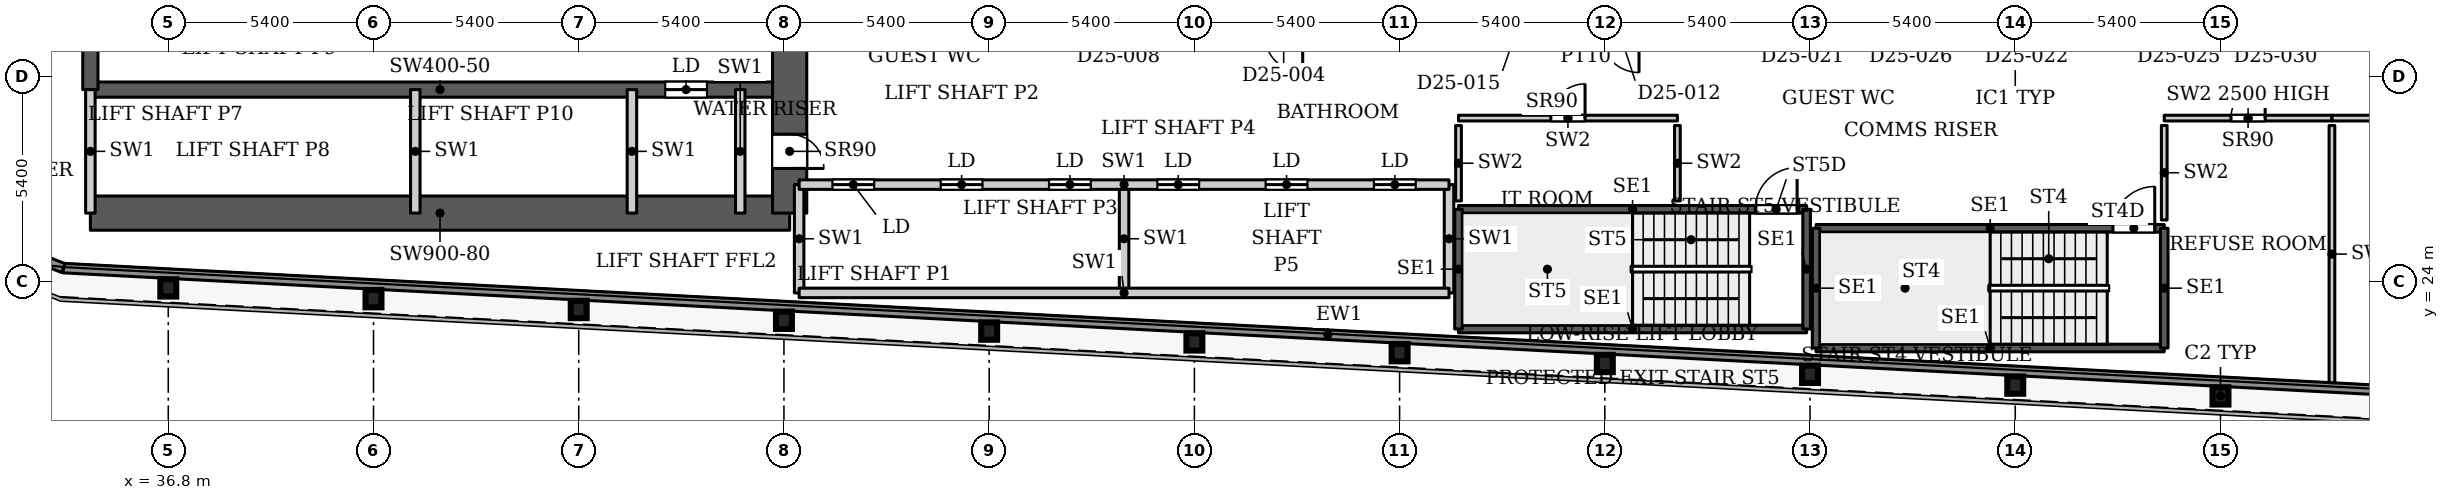
"""IFC4 building model, lengths in metres.
Left out: names, types, materials, properties, quantities, classifications, styles, units other than length and angle.
Written with IfcOpenShell. Run it as: python <this file> out.ifc"""

import sys

from ifc_helpers import new_model, si_unit, direction, frame, frame_2d, origin, origin_2d, place, context, subcontext, project, spatial, rectangle, i_section, extrude, source, transform, mapped, element, fill, save


model = new_model("IFC4")
c1 = context("Model", 3, precision=1e-05, world=origin(), true_north=direction((0.0, 1.0)))
c2 = subcontext(c1, "Body", "Model", "MODEL_VIEW")
j1 = project(units=[si_unit("LENGTHUNIT", "METRE"), si_unit("PLANEANGLEUNIT", "RADIAN")], contexts=[c1])
p1 = place(None, origin())
s1 = spatial("IfcSite", under=j1, at=p1, CompositionType="ELEMENT")
p2 = place(p1, origin())
s2 = spatial("IfcBuilding", under=s1, at=p2, CompositionType="ELEMENT")
p3 = place(p2, frame((0.0, 0.0, 113.6)))
s3 = spatial("IfcBuildingStorey", under=s2, at=p3, CompositionType="ELEMENT", Elevation=113.6)
for number, where, z_axis, x_axis in (
    (1, (90.8, 20.99, 0.0), (0.0, 0.0, 1.0), (1.0, 0.0, 0.0)),
    (2, (85.4, 21.274, 0.0), (0.0, 0.0, 1.0), (1.0, 0.0, 0.0)),
    (3, (80.0, 21.558, 0.0), (0.0, 0.0, 1.0), (1.0, 0.0, 0.0)),
    (4, (74.6, 21.843, 0.0), (0.0, 0.0, 1.0), (1.0, 0.0, 0.0)),
    (5, (69.2, 22.127, 0.0), (0.0, 0.0, 1.0), (1.0, 0.0, 0.0)),
    (6, (63.8, 22.411, 0.0), (0.0, 0.0, 1.0), (1.0, 0.0, 0.0)),
    (7, (58.4, 22.695, 0.0), (0.0, 0.0, 1.0), (1.0, 0.0, 0.0)),
    (8, (53.0, 22.98, 0.0), (0.0, 0.0, 1.0), (1.0, 0.0, 0.0)),
    (9, (47.6, 23.264, 0.0), (0.0, 0.0, 1.0), (1.0, 0.0, 0.0)),
    (10, (42.2, 23.548, 0.0), (0.0, 0.0, 1.0), (1.0, 0.0, 0.0)),
    (11, (36.8, 23.832, 0.0), (0.0, 0.0, 1.0), (1.0, 0.0, 0.0)),
):
    element("IfcColumn", number, at=place(p3, frame(where, z_axis=z_axis, x_axis=x_axis)), inside=s3, PredefinedType="COLUMN", context=c2, shape_type="SweptSolid", body=[
        extrude(i_section(OverallWidth=0.418, OverallDepth=0.455, WebThickness=0.042, FlangeThickness=0.068, FilletRadius=0.014, at=origin_2d()), origin(), (0.0, 0.0, 1.0), 3.9),
    ])
p4 = place(p3, frame((34.75, 25.8, 0.0), z_axis=(0.0, 0.0, 1.0), x_axis=(1.0, 0.0, 0.0)))
e12 = element("IfcWall", 12, at=p4, inside=s3, PredefinedType="SHEAR", context=c2, shape_type="SweptSolid", body=[
    extrude(rectangle(XDim=18.4, YDim=0.9, at=frame_2d((9.2, 0.0))), origin(), (0.0, 0.0, 1.0), 3.9),
])
p5 = place(p3, frame((34.75, 29.05, 0.0), z_axis=(0.0, 0.0, 1.0), x_axis=(1.0, 0.0, 0.0)))
e13 = element("IfcWall", 13, at=p5, inside=s3, PredefinedType="SHEAR", context=c2, shape_type="SweptSolid", body=[
    extrude(rectangle(XDim=18.4, YDim=0.4, at=frame_2d((9.2, 0.0))), origin(), (0.0, 0.0, 1.0), 3.9),
])
p6 = place(p5, frame((15.125, 0.0, 0.0)))
e14 = element("IfcOpeningElement", 14, at=p6, cuts=e13, PredefinedType="OPENING", context=c2, shape_type="SweptSolid", body=[
    extrude(rectangle(XDim=1.1, YDim=2.2, at=frame_2d((0.55, 1.1))), frame((0.0, 0.21, 0.0), z_axis=(0.0, -1.0, 0.0), x_axis=(1.0, 0.0, 0.0)), (0.0, 0.0, 1.0), 0.42),
])
p7 = place(p3, frame((34.75, 29.05, 0.0), z_axis=(0.0, 0.0, 1.0), x_axis=(0.0, 1.0, 0.0)))
e15 = element("IfcWall", 15, at=p7, inside=s3, PredefinedType="SHEAR", context=c2, shape_type="SweptSolid", body=[
    extrude(rectangle(XDim=18.45, YDim=0.4, at=frame_2d((9.225, 0.0))), origin(), (0.0, 0.0, 1.0), 3.9),
])
p8 = place(p7, frame((8.025, 0.0, 0.0)))
e16 = element("IfcOpeningElement", 16, at=p8, cuts=e15, PredefinedType="OPENING", context=c2, shape_type="SweptSolid", body=[
    extrude(rectangle(XDim=1.1, YDim=2.2, at=frame_2d((0.55, 1.1))), frame((0.0, 0.21, 0.0), z_axis=(0.0, -1.0, 0.0), x_axis=(1.0, 0.0, 0.0)), (0.0, 0.0, 1.0), 0.42),
])
p9 = place(p7, frame((10.875, 0.0, 0.0)))
e17 = element("IfcOpeningElement", 17, at=p9, cuts=e15, PredefinedType="OPENING", context=c2, shape_type="SweptSolid", body=[
    extrude(rectangle(XDim=1.1, YDim=2.2, at=frame_2d((0.55, 1.1))), frame((0.0, 0.21, 0.0), z_axis=(0.0, -1.0, 0.0), x_axis=(1.0, 0.0, 0.0)), (0.0, 0.0, 1.0), 0.42),
])
p10 = place(p7, frame((13.725, 0.0, 0.0)))
e18 = element("IfcOpeningElement", 18, at=p10, cuts=e15, PredefinedType="OPENING", context=c2, shape_type="SweptSolid", body=[
    extrude(rectangle(XDim=1.1, YDim=2.2, at=frame_2d((0.55, 1.1))), frame((0.0, 0.21, 0.0), z_axis=(0.0, -1.0, 0.0), x_axis=(1.0, 0.0, 0.0)), (0.0, 0.0, 1.0), 0.42),
])
p11 = place(p7, frame((15.95, 0.0, 0.0)))
e19 = element("IfcOpeningElement", 19, at=p11, cuts=e15, PredefinedType="OPENING", context=c2, shape_type="SweptSolid", body=[
    extrude(rectangle(XDim=1.1, YDim=2.2, at=frame_2d((0.55, 1.1))), frame((0.0, 0.21, 0.0), z_axis=(0.0, -1.0, 0.0), x_axis=(1.0, 0.0, 0.0)), (0.0, 0.0, 1.0), 0.42),
])
p12 = place(p3, frame((53.15, 25.8, 0.0), z_axis=(0.0, 0.0, 1.0), x_axis=(0.0, 1.0, 0.0)))
e20 = element("IfcWall", 20, at=p12, inside=s3, PredefinedType="SHEAR", context=c2, shape_type="SweptSolid", body=[
    extrude(rectangle(XDim=10.4, YDim=0.9, at=frame_2d((5.2, 0.0))), origin(), (0.0, 0.0, 1.0), 3.9),
])
p13 = place(p12, frame((1.175, 0.0, 0.0)))
e21 = element("IfcOpeningElement", 21, at=p13, cuts=e20, PredefinedType="OPENING", context=c2, shape_type="SweptSolid", body=[
    extrude(rectangle(XDim=0.9, YDim=2.2, at=frame_2d((0.45, 1.1))), frame((0.0, 0.46, 0.0), z_axis=(0.0, -1.0, 0.0), x_axis=(1.0, 0.0, 0.0)), (0.0, 0.0, 1.0), 0.92),
])
p14 = place(p3, frame((100.586, 20.85, 0.0), z_axis=(0.0, 0.0, 1.0), x_axis=(-0.99861746497, 0.052565755559, 0.0)))
e22 = element("IfcWall", 22, at=p14, inside=s3, PredefinedType="SOLIDWALL", context=c2, shape_type="SweptSolid", body=[
    extrude(rectangle(XDim=66.639, YDim=0.25, at=frame_2d((33.319, 0.0))), origin(), (0.0, 0.0, 1.0), 3.75),
])
p15 = place(p3, frame((34.039, 24.353, 0.0), z_axis=(0.0, 0.0, 1.0), x_axis=(-0.929352825399, 0.369192803184, 0.0)))
e23 = element("IfcWall", 23, at=p15, inside=s3, PredefinedType="SOLIDWALL", context=c2, shape_type="SweptSolid", body=[
    extrude(rectangle(XDim=4.656, YDim=0.25, at=frame_2d((2.328, 0.0))), origin(), (0.0, 0.0, 1.0), 3.75),
])
p16 = place(p3, frame((80.16, 22.25, 0.0), z_axis=(0.0, 0.0, 1.0), x_axis=(1.0, 0.0, 0.0)))
e24 = element("IfcWall", 24, at=p16, inside=s3, PredefinedType="SHEAR", context=c2, shape_type="SweptSolid", body=[
    extrude(rectangle(XDim=9.16, YDim=0.2, at=frame_2d((4.58, 0.0))), origin(), (0.0, 0.0, 1.0), 3.9),
])
p17 = place(p3, frame((80.16, 25.4, 0.0), z_axis=(0.0, 0.0, 1.0), x_axis=(1.0, 0.0, 0.0)))
e25 = element("IfcWall", 25, at=p17, inside=s3, PredefinedType="SHEAR", context=c2, shape_type="SweptSolid", body=[
    extrude(rectangle(XDim=9.16, YDim=0.2, at=frame_2d((4.58, 0.0))), origin(), (0.0, 0.0, 1.0), 3.9),
])
p18 = place(p17, frame((7.81, 0.0, 0.0)))
e26 = element("IfcOpeningElement", 26, at=p18, cuts=e25, PredefinedType="OPENING", context=c2, shape_type="SweptSolid", body=[
    extrude(rectangle(XDim=1.1, YDim=2.2, at=frame_2d((0.55, 1.1))), frame((0.0, 0.11, 0.0), z_axis=(0.0, -1.0, 0.0), x_axis=(1.0, 0.0, 0.0)), (0.0, 0.0, 1.0), 0.22),
])
for number, where, z_axis, x_axis in (
    (27, (80.16, 22.25, 0.0), (0.0, 0.0, 1.0), (0.0, 1.0, 0.0)),
    (28, (89.32, 22.25, 0.0), (0.0, 0.0, 1.0), (0.0, 1.0, 0.0)),
):
    element("IfcWall", number, at=place(p3, frame(where, z_axis=z_axis, x_axis=x_axis)), inside=s3, PredefinedType="SHEAR", context=c2, shape_type="SweptSolid", body=[
        extrude(rectangle(XDim=3.15, YDim=0.2, at=frame_2d((1.575, 0.0))), origin(), (0.0, 0.0, 1.0), 3.9),
    ])
p19 = place(p3, frame((70.75, 22.75, 0.0), z_axis=(0.0, 0.0, 1.0), x_axis=(1.0, 0.0, 0.0)))
e29 = element("IfcWall", 29, at=p19, inside=s3, PredefinedType="SHEAR", context=c2, shape_type="SweptSolid", body=[
    extrude(rectangle(XDim=9.16, YDim=0.2, at=frame_2d((4.58, 0.0))), origin(), (0.0, 0.0, 1.0), 3.9),
])
p20 = place(p3, frame((70.75, 25.9, 0.0), z_axis=(0.0, 0.0, 1.0), x_axis=(1.0, 0.0, 0.0)))
e30 = element("IfcWall", 30, at=p20, inside=s3, PredefinedType="SHEAR", context=c2, shape_type="SweptSolid", body=[
    extrude(rectangle(XDim=9.16, YDim=0.2, at=frame_2d((4.58, 0.0))), origin(), (0.0, 0.0, 1.0), 3.9),
])
p21 = place(p20, frame((7.81, 0.0, 0.0)))
e31 = element("IfcOpeningElement", 31, at=p21, cuts=e30, PredefinedType="OPENING", context=c2, shape_type="SweptSolid", body=[
    extrude(rectangle(XDim=1.1, YDim=2.2, at=frame_2d((0.55, 1.1))), frame((0.0, 0.11, 0.0), z_axis=(0.0, -1.0, 0.0), x_axis=(1.0, 0.0, 0.0)), (0.0, 0.0, 1.0), 0.22),
])
for number, where, z_axis, x_axis in (
    (32, (70.75, 22.75, 0.0), (0.0, 0.0, 1.0), (0.0, 1.0, 0.0)),
    (33, (79.91, 22.75, 0.0), (0.0, 0.0, 1.0), (0.0, 1.0, 0.0)),
):
    element("IfcWall", number, at=place(p3, frame(where, z_axis=z_axis, x_axis=x_axis)), inside=s3, PredefinedType="SHEAR", context=c2, shape_type="SweptSolid", body=[
        extrude(rectangle(XDim=3.15, YDim=0.2, at=frame_2d((1.575, 0.0))), origin(), (0.0, 0.0, 1.0), 3.9),
    ])
for number, where, z_axis, x_axis in (
    (34, (34.75, 25.8, 0.0), (0.0, 0.0, 1.0), (0.0, 1.0, 0.0)),
    (35, (43.3, 25.8, 0.0), (0.0, 0.0, 1.0), (0.0, 1.0, 0.0)),
    (36, (49.0, 25.8, 0.0), (0.0, 0.0, 1.0), (0.0, 1.0, 0.0)),
    (37, (51.85, 25.8, 0.0), (0.0, 0.0, 1.0), (0.0, 1.0, 0.0)),
):
    element("IfcWall", number, at=place(p3, frame(where, z_axis=z_axis, x_axis=x_axis)), inside=s3, PredefinedType="PARTITIONING", context=c2, shape_type="SweptSolid", body=[
        extrude(rectangle(XDim=3.25, YDim=0.25, at=frame_2d((1.625, 0.0))), origin(), (0.0, 0.0, 1.0), 3.9),
    ])
for number, where, z_axis, x_axis in (
    (38, (53.4, 23.7, 0.0), (0.0, 0.0, 1.0), (0.0, 1.0, 0.0)),
    (39, (61.95, 23.7, 0.0), (0.0, 0.0, 1.0), (0.0, 1.0, 0.0)),
    (40, (70.5, 23.7, 0.0), (0.0, 0.0, 1.0), (0.0, 1.0, 0.0)),
):
    element("IfcWall", number, at=place(p3, frame(where, z_axis=z_axis, x_axis=x_axis)), inside=s3, PredefinedType="PARTITIONING", context=c2, shape_type="SweptSolid", body=[
        extrude(rectangle(XDim=2.85, YDim=0.25, at=frame_2d((1.425, 0.0))), origin(), (0.0, 0.0, 1.0), 3.9),
    ])
p22 = place(p3, frame((53.4, 23.7, 0.0), z_axis=(0.0, 0.0, 1.0), x_axis=(1.0, 0.0, 0.0)))
e41 = element("IfcWall", 41, at=p22, inside=s3, PredefinedType="PARTITIONING", context=c2, shape_type="SweptSolid", body=[
    extrude(rectangle(XDim=17.1, YDim=0.25, at=frame_2d((8.55, 0.0))), origin(), (0.0, 0.0, 1.0), 3.9),
])
p23 = place(p3, frame((53.4, 26.55, 0.0), z_axis=(0.0, 0.0, 1.0), x_axis=(1.0, 0.0, 0.0)))
e42 = element("IfcWall", 42, at=p23, inside=s3, PredefinedType="PARTITIONING", context=c2, shape_type="SweptSolid", body=[
    extrude(rectangle(XDim=17.1, YDim=0.25, at=frame_2d((8.55, 0.0))), origin(), (0.0, 0.0, 1.0), 3.9),
])
p24 = place(p23, frame((0.875, 0.0, 0.0)))
e43 = element("IfcOpeningElement", 43, at=p24, cuts=e42, PredefinedType="OPENING", context=c2, shape_type="SweptSolid", body=[
    extrude(rectangle(XDim=1.1, YDim=2.2, at=frame_2d((0.55, 1.1))), frame((0.0, 0.135, 0.0), z_axis=(0.0, -1.0, 0.0), x_axis=(1.0, 0.0, 0.0)), (0.0, 0.0, 1.0), 0.27),
])
p25 = place(p23, frame((3.725, 0.0, 0.0)))
e44 = element("IfcOpeningElement", 44, at=p25, cuts=e42, PredefinedType="OPENING", context=c2, shape_type="SweptSolid", body=[
    extrude(rectangle(XDim=1.1, YDim=2.2, at=frame_2d((0.55, 1.1))), frame((0.0, 0.135, 0.0), z_axis=(0.0, -1.0, 0.0), x_axis=(1.0, 0.0, 0.0)), (0.0, 0.0, 1.0), 0.27),
])
p26 = place(p23, frame((6.575, 0.0, 0.0)))
e45 = element("IfcOpeningElement", 45, at=p26, cuts=e42, PredefinedType="OPENING", context=c2, shape_type="SweptSolid", body=[
    extrude(rectangle(XDim=1.1, YDim=2.2, at=frame_2d((0.55, 1.1))), frame((0.0, 0.135, 0.0), z_axis=(0.0, -1.0, 0.0), x_axis=(1.0, 0.0, 0.0)), (0.0, 0.0, 1.0), 0.27),
])
p27 = place(p23, frame((9.425, 0.0, 0.0)))
e46 = element("IfcOpeningElement", 46, at=p27, cuts=e42, PredefinedType="OPENING", context=c2, shape_type="SweptSolid", body=[
    extrude(rectangle(XDim=1.1, YDim=2.2, at=frame_2d((0.55, 1.1))), frame((0.0, 0.135, 0.0), z_axis=(0.0, -1.0, 0.0), x_axis=(1.0, 0.0, 0.0)), (0.0, 0.0, 1.0), 0.27),
])
p28 = place(p23, frame((12.275, 0.0, 0.0)))
e47 = element("IfcOpeningElement", 47, at=p28, cuts=e42, PredefinedType="OPENING", context=c2, shape_type="SweptSolid", body=[
    extrude(rectangle(XDim=1.1, YDim=2.2, at=frame_2d((0.55, 1.1))), frame((0.0, 0.135, 0.0), z_axis=(0.0, -1.0, 0.0), x_axis=(1.0, 0.0, 0.0)), (0.0, 0.0, 1.0), 0.27),
])
p29 = place(p23, frame((15.125, 0.0, 0.0)))
e48 = element("IfcOpeningElement", 48, at=p29, cuts=e42, PredefinedType="OPENING", context=c2, shape_type="SweptSolid", body=[
    extrude(rectangle(XDim=1.1, YDim=2.2, at=frame_2d((0.55, 1.1))), frame((0.0, 0.135, 0.0), z_axis=(0.0, -1.0, 0.0), x_axis=(1.0, 0.0, 0.0)), (0.0, 0.0, 1.0), 0.27),
])
p30 = place(p3, frame((70.75, 28.3, 0.0), z_axis=(0.0, 0.0, 1.0), x_axis=(1.0, 0.0, 0.0)))
e49 = element("IfcWall", 49, at=p30, inside=s3, PredefinedType="PARTITIONING", context=c2, shape_type="SweptSolid", body=[
    extrude(rectangle(XDim=5.76, YDim=0.15, at=frame_2d((2.88, 0.0))), origin(), (0.0, 0.0, 1.0), 3.9),
])
p31 = place(p30, frame((2.43, 0.0, 0.0)))
e50 = element("IfcOpeningElement", 50, at=p31, cuts=e49, PredefinedType="OPENING", context=c2, shape_type="SweptSolid", body=[
    extrude(rectangle(XDim=0.9, YDim=2.2, at=frame_2d((0.45, 1.1))), frame((0.0, 0.085, 0.0), z_axis=(0.0, -1.0, 0.0), x_axis=(1.0, 0.0, 0.0)), (0.0, 0.0, 1.0), 0.17),
])
for number, where, z_axis, x_axis in (
    (51, (70.75, 26.12, 0.0), (0.0, 0.0, 1.0), (0.0, 1.0, 0.0)),
    (52, (76.51, 26.12, 0.0), (0.0, 0.0, 1.0), (0.0, 1.0, 0.0)),
):
    element("IfcWall", number, at=place(p3, frame(where, z_axis=z_axis, x_axis=x_axis)), inside=s3, PredefinedType="PARTITIONING", context=c2, shape_type="SweptSolid", body=[
        extrude(rectangle(XDim=1.985, YDim=0.15, at=frame_2d((0.992, 0.0))), origin(), (0.0, 0.0, 1.0), 3.9),
    ])
p32 = place(p3, frame((89.32, 28.3, 0.0), z_axis=(0.0, 0.0, 1.0), x_axis=(1.0, 0.0, 0.0)))
e53 = element("IfcWall", 53, at=p32, inside=s3, PredefinedType="PARTITIONING", context=c2, shape_type="SweptSolid", body=[
    extrude(rectangle(XDim=4.413, YDim=0.15, at=frame_2d((2.207, 0.0))), origin(), (0.0, 0.0, 1.0), 2.5),
])
p33 = place(p32, frame((1.756, 0.0, 0.0)))
e54 = element("IfcOpeningElement", 54, at=p33, cuts=e53, PredefinedType="OPENING", context=c2, shape_type="SweptSolid", body=[
    extrude(rectangle(XDim=0.9, YDim=2.2, at=frame_2d((0.45, 1.1))), frame((0.0, 0.085, 0.0), z_axis=(0.0, -1.0, 0.0), x_axis=(1.0, 0.0, 0.0)), (0.0, 0.0, 1.0), 0.17),
])
p34 = place(p3, frame((89.32, 25.62, 0.0), z_axis=(0.0, 0.0, 1.0), x_axis=(0.0, 1.0, 0.0)))
e55 = element("IfcWall", 55, at=p34, inside=s3, PredefinedType="PARTITIONING", context=c2, shape_type="SweptSolid", body=[
    extrude(rectangle(XDim=2.485, YDim=0.15, at=frame_2d((1.242, 0.0))), origin(), (0.0, 0.0, 1.0), 3.9),
])
p35 = place(p3, frame((93.733, 21.338, 0.0), z_axis=(0.0, 0.0, 1.0), x_axis=(0.0, 1.0, 0.0)))
e56 = element("IfcWall", 56, at=p35, inside=s3, PredefinedType="PARTITIONING", context=c2, shape_type="SweptSolid", body=[
    extrude(rectangle(XDim=6.767, YDim=0.15, at=frame_2d((3.384, 0.0))), origin(), (0.0, 0.0, 1.0), 3.9),
])
p36 = place(p3, frame((93.733, 28.3, 0.0), z_axis=(0.0, 0.0, 1.0), x_axis=(1.0, 0.0, 0.0)))
e57 = element("IfcWall", 57, at=p36, inside=s3, PredefinedType="PARTITIONING", context=c2, shape_type="SweptSolid", body=[
    extrude(rectangle(XDim=6.165, YDim=0.15, at=frame_2d((3.083, 0.0))), origin(), (0.0, 0.0, 1.0), 3.9),
])
p37 = place(p36, frame((1.683, 0.0, 0.0)))
e58 = element("IfcOpeningElement", 58, at=p37, cuts=e57, PredefinedType="OPENING", context=c2, shape_type="SweptSolid", body=[
    extrude(rectangle(XDim=0.9, YDim=2.2, at=frame_2d((0.45, 1.1))), frame((0.0, 0.085, 0.0), z_axis=(0.0, -1.0, 0.0), x_axis=(1.0, 0.0, 0.0)), (0.0, 0.0, 1.0), 0.17),
])
m1 = source(origin(), c2, "Body", "SweptSolid", [
    extrude(rectangle(XDim=1.1, YDim=2.2, at=frame_2d((0.55, 1.1))), frame((0.0, 0.025, 0.0), z_axis=(0.0, -1.0, 0.0), x_axis=(1.0, 0.0, 0.0)), (0.0, 0.0, 1.0), 0.05),
])
p38 = place(p24, origin())
e59 = element("IfcDoor", 59, at=p38, inside=s3, OperationType="SLIDING_TO_LEFT", PredefinedType="DOOR", context=c2, shape_type="MappedRepresentation", body=[
    mapped(m1, transform((0.0, 0.0, 0.0), x_axis=(1.0, 0.0, 0.0), y_axis=(0.0, 1.0, 0.0), z_axis=(0.0, 0.0, 1.0), scale=1.0)),
])
fill(e43, e59)
p39 = place(p25, origin())
e60 = element("IfcDoor", 60, at=p39, inside=s3, OperationType="SLIDING_TO_LEFT", PredefinedType="DOOR", context=c2, shape_type="MappedRepresentation", body=[
    mapped(m1, transform((0.0, 0.0, 0.0), x_axis=(1.0, 0.0, 0.0), y_axis=(0.0, 1.0, 0.0), z_axis=(0.0, 0.0, 1.0), scale=1.0)),
])
fill(e44, e60)
p40 = place(p26, origin())
e61 = element("IfcDoor", 61, at=p40, inside=s3, OperationType="SLIDING_TO_LEFT", PredefinedType="DOOR", context=c2, shape_type="MappedRepresentation", body=[
    mapped(m1, transform((0.0, 0.0, 0.0), x_axis=(1.0, 0.0, 0.0), y_axis=(0.0, 1.0, 0.0), z_axis=(0.0, 0.0, 1.0), scale=1.0)),
])
fill(e45, e61)
p41 = place(p27, origin())
e62 = element("IfcDoor", 62, at=p41, inside=s3, OperationType="SLIDING_TO_LEFT", PredefinedType="DOOR", context=c2, shape_type="MappedRepresentation", body=[
    mapped(m1, transform((0.0, 0.0, 0.0), x_axis=(1.0, 0.0, 0.0), y_axis=(0.0, 1.0, 0.0), z_axis=(0.0, 0.0, 1.0), scale=1.0)),
])
fill(e46, e62)
p42 = place(p28, origin())
e63 = element("IfcDoor", 63, at=p42, inside=s3, OperationType="SLIDING_TO_LEFT", PredefinedType="DOOR", context=c2, shape_type="MappedRepresentation", body=[
    mapped(m1, transform((0.0, 0.0, 0.0), x_axis=(1.0, 0.0, 0.0), y_axis=(0.0, 1.0, 0.0), z_axis=(0.0, 0.0, 1.0), scale=1.0)),
])
fill(e47, e63)
p43 = place(p29, origin())
e64 = element("IfcDoor", 64, at=p43, inside=s3, OperationType="SLIDING_TO_LEFT", PredefinedType="DOOR", context=c2, shape_type="MappedRepresentation", body=[
    mapped(m1, transform((0.0, 0.0, 0.0), x_axis=(1.0, 0.0, 0.0), y_axis=(0.0, 1.0, 0.0), z_axis=(0.0, 0.0, 1.0), scale=1.0)),
])
fill(e48, e64)
p44 = place(p6, origin())
e65 = element("IfcDoor", 65, at=p44, inside=s3, OperationType="SLIDING_TO_LEFT", PredefinedType="DOOR", context=c2, shape_type="MappedRepresentation", body=[
    mapped(m1, transform((0.0, 0.0, 0.0), x_axis=(1.0, 0.0, 0.0), y_axis=(0.0, 1.0, 0.0), z_axis=(0.0, 0.0, 1.0), scale=1.0)),
])
fill(e14, e65)
m2 = source(origin(), c2, "Body", "SweptSolid", [
    extrude(rectangle(XDim=0.9, YDim=2.2, at=frame_2d((0.45, 1.1))), frame((0.0, 0.025, 0.0), z_axis=(0.0, -1.0, 0.0), x_axis=(1.0, 0.0, 0.0)), (0.0, 0.0, 1.0), 0.05),
])
p45 = place(p13, origin())
e66 = element("IfcDoor", 66, at=p45, inside=s3, OperationType="SINGLE_SWING_RIGHT", PredefinedType="DOOR", context=c2, shape_type="MappedRepresentation", body=[
    mapped(m2, transform((0.0, 0.0, 0.0), x_axis=(1.0, 0.0, 0.0), y_axis=(0.0, 1.0, 0.0), z_axis=(0.0, 0.0, 1.0), scale=1.0)),
])
fill(e21, e66)
p46 = place(p31, origin())
e67 = element("IfcDoor", 67, at=p46, inside=s3, OperationType="SINGLE_SWING_LEFT", PredefinedType="DOOR", context=c2, shape_type="MappedRepresentation", body=[
    mapped(m2, transform((0.0, 0.0, 0.0), x_axis=(1.0, 0.0, 0.0), y_axis=(0.0, 1.0, 0.0), z_axis=(0.0, 0.0, 1.0), scale=1.0)),
])
fill(e50, e67)
p47 = place(p33, origin())
e68 = element("IfcDoor", 68, at=p47, inside=s3, OperationType="SINGLE_SWING_LEFT", PredefinedType="DOOR", context=c2, shape_type="MappedRepresentation", body=[
    mapped(m2, transform((0.0, 0.0, 0.0), x_axis=(1.0, 0.0, 0.0), y_axis=(0.0, 1.0, 0.0), z_axis=(0.0, 0.0, 1.0), scale=1.0)),
])
fill(e54, e68)
m3 = source(origin(), c2, "Body", "SweptSolid", [
    extrude(rectangle(XDim=1.1, YDim=2.2, at=frame_2d((0.55, 1.1))), frame((0.0, 0.025, 0.0), z_axis=(0.0, -1.0, 0.0), x_axis=(1.0, 0.0, 0.0)), (0.0, 0.0, 1.0), 0.05),
])
p48 = place(p18, origin())
e69 = element("IfcDoor", 69, at=p48, inside=s3, OperationType="SINGLE_SWING_LEFT", PredefinedType="DOOR", context=c2, shape_type="MappedRepresentation", body=[
    mapped(m3, transform((0.0, 0.0, 0.0), x_axis=(1.0, 0.0, 0.0), y_axis=(0.0, 1.0, 0.0), z_axis=(0.0, 0.0, 1.0), scale=1.0)),
])
fill(e26, e69)
p49 = place(p21, origin())
e70 = element("IfcDoor", 70, at=p49, inside=s3, OperationType="SINGLE_SWING_LEFT", PredefinedType="DOOR", context=c2, shape_type="MappedRepresentation", body=[
    mapped(m3, transform((0.0, 0.0, 0.0), x_axis=(1.0, 0.0, 0.0), y_axis=(0.0, 1.0, 0.0), z_axis=(0.0, 0.0, 1.0), scale=1.0)),
])
fill(e31, e70)
save(model, sys.argv[1])
